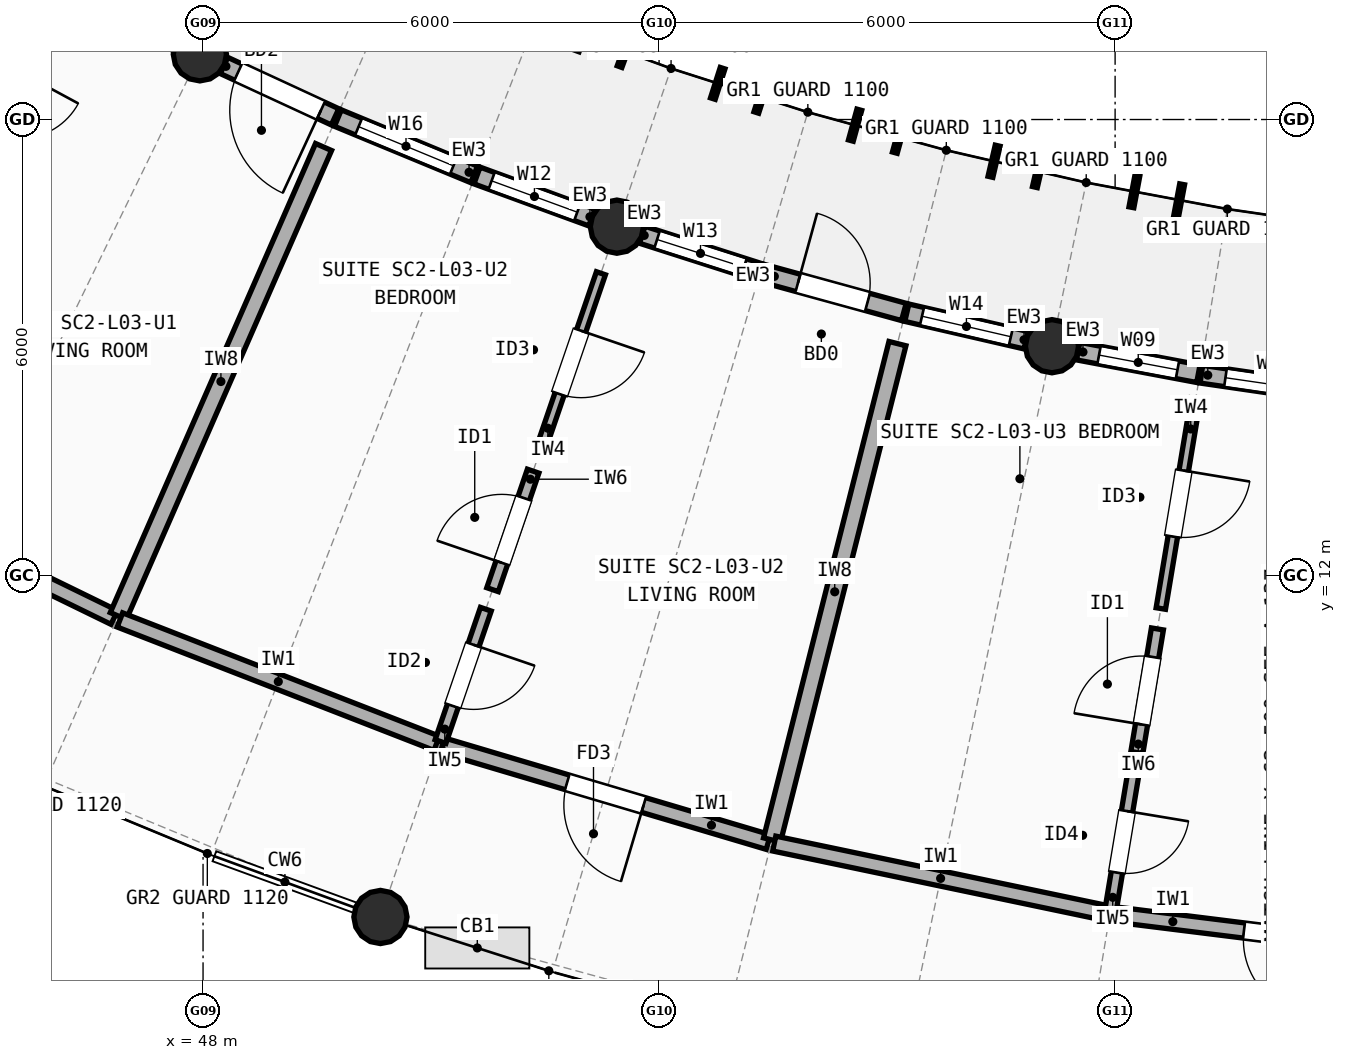
"""IFC4 building model, lengths in metres.
Left out: names, types, materials, properties, quantities, classifications, styles, units other than length and angle.
Written with IfcOpenShell. Run it as: python <this file> out.ifc"""

import sys

from ifc_helpers import new_model, si_unit, direction, frame, frame_2d, origin, origin_2d, place, context, subcontext, project, spatial, rectangle, circle, extrude, element, fill, save


model = new_model("IFC4")
c1 = context("Model", 3, precision=1e-05, world=origin(), true_north=direction((0.0, 1.0)))
c2 = subcontext(c1, "Body", "Model", "MODEL_VIEW")
j1 = project(units=[si_unit("LENGTHUNIT", "METRE"), si_unit("PLANEANGLEUNIT", "RADIAN")], contexts=[c1])
p1 = place(None, origin())
s1 = spatial("IfcSite", under=j1, at=p1, CompositionType="ELEMENT")
p2 = place(p1, origin())
s2 = spatial("IfcBuilding", under=s1, at=p2, CompositionType="ELEMENT")
p3 = place(p2, frame((0.0, 0.0, 10.9)))
s3 = spatial("IfcBuildingStorey", under=s2, at=p3, CompositionType="ELEMENT", Elevation=10.9)
for number, where, z_axis, x_axis in (
    (1, (47.958, 18.858, 0.0), (0.0, 0.0, 1.0), (1.0, 0.0, 0.0)),
    (2, (53.445, 16.59, 0.0), (0.0, 0.0, 1.0), (1.0, 0.0, 0.0)),
    (3, (50.334, 7.508, 0.0), (0.0, 0.0, 1.0), (1.0, 0.0, 0.0)),
    (4, (59.169, 15.018, 0.0), (0.0, 0.0, 1.0), (1.0, 0.0, 0.0)),
):
    element("IfcColumn", number, at=place(p3, frame(where, z_axis=z_axis, x_axis=x_axis)), inside=s3, PredefinedType="COLUMN", context=c2, shape_type="SweptSolid", body=[
        extrude(circle(Radius=0.35, at=origin_2d()), origin(), (0.0, 0.0, 1.0), 2.948),
    ])
p4 = place(p3, frame((48.276, 18.711, 0.0), z_axis=(0.0, 0.0, 1.0), x_axis=(0.907630651946, -0.419769698344, 0.0)))
e5 = element("IfcWall", 5, at=p4, inside=s3, PredefinedType="STANDARD", context=c2, shape_type="SweptSolid", body=[
    extrude(rectangle(XDim=1.61, YDim=0.235, at=frame_2d((0.805, 0.0))), origin(), (0.0, 0.0, 1.0), 2.684),
])
p5 = place(p4, frame((0.205, 0.0, 0.0)))
e6 = element("IfcOpeningElement", 6, at=p5, cuts=e5, PredefinedType="OPENING", context=c2, shape_type="SweptSolid", body=[
    extrude(rectangle(XDim=1.2, YDim=2.15, at=frame_2d((0.6, 1.075))), frame((0.0, 0.127, 0.0), z_axis=(0.0, -1.0, 0.0), x_axis=(1.0, 0.0, 0.0)), (0.0, 0.0, 1.0), 0.255),
])
p6 = place(p3, frame((49.774, 18.019, 0.0), z_axis=(0.0, 0.0, 1.0), x_axis=(0.92414555515, -0.382040564465, 0.0)))
e7 = element("IfcWall", 7, at=p6, inside=s3, PredefinedType="STANDARD", context=c2, shape_type="SweptSolid", body=[
    extrude(rectangle(XDim=1.94, YDim=0.235, at=frame_2d((0.97, 0.0))), origin(), (0.0, 0.0, 1.0), 2.684),
])
p7 = place(p6, frame((0.295, 0.0, 0.85)))
e8 = element("IfcOpeningElement", 8, at=p7, cuts=e7, PredefinedType="OPENING", context=c2, shape_type="SweptSolid", body=[
    extrude(rectangle(XDim=1.35, YDim=1.5, at=frame_2d((0.675, 0.75))), frame((0.0, 0.127, 0.0), z_axis=(0.0, -1.0, 0.0), x_axis=(1.0, 0.0, 0.0)), (0.0, 0.0, 1.0), 0.255),
])
p8 = place(p3, frame((51.604, 17.264, 0.0), z_axis=(0.0, 0.0, 1.0), x_axis=(0.939176538502, -0.34343475294, 0.0)))
e9 = element("IfcWall", 9, at=p8, inside=s3, PredefinedType="STANDARD", context=c2, shape_type="SweptSolid", body=[
    extrude(rectangle(XDim=1.61, YDim=0.235, at=frame_2d((0.805, 0.0))), origin(), (0.0, 0.0, 1.0), 2.684),
])
p9 = place(p8, frame((0.205, 0.0, 0.85)))
e10 = element("IfcOpeningElement", 10, at=p9, cuts=e9, PredefinedType="OPENING", context=c2, shape_type="SweptSolid", body=[
    extrude(rectangle(XDim=1.2, YDim=1.35, at=frame_2d((0.6, 0.675))), frame((0.0, 0.127, 0.0), z_axis=(0.0, -1.0, 0.0), x_axis=(1.0, 0.0, 0.0)), (0.0, 0.0, 1.0), 0.255),
])
p10 = place(p3, frame((53.778, 16.484, 0.0), z_axis=(0.0, 0.0, 1.0), x_axis=(0.952508629145, -0.304511594861, 0.0)))
e11 = element("IfcWall", 11, at=p10, inside=s3, PredefinedType="STANDARD", context=c2, shape_type="SweptSolid", body=[
    extrude(rectangle(XDim=1.61, YDim=0.235, at=frame_2d((0.805, 0.0))), origin(), (0.0, 0.0, 1.0), 2.684),
])
p11 = place(p10, frame((0.205, 0.0, 0.85)))
e12 = element("IfcOpeningElement", 12, at=p11, cuts=e11, PredefinedType="OPENING", context=c2, shape_type="SweptSolid", body=[
    extrude(rectangle(XDim=1.2, YDim=1.45, at=frame_2d((0.6, 0.725))), frame((0.0, 0.127, 0.0), z_axis=(0.0, -1.0, 0.0), x_axis=(1.0, 0.0, 0.0)), (0.0, 0.0, 1.0), 0.255),
])
p12 = place(p3, frame((55.35, 15.982, 0.0), z_axis=(0.0, 0.0, 1.0), x_axis=(0.964271323293, -0.264916619098, 0.0)))
e13 = element("IfcWall", 13, at=p12, inside=s3, PredefinedType="STANDARD", context=c2, shape_type="SweptSolid", body=[
    extrude(rectangle(XDim=1.94, YDim=0.235, at=frame_2d((0.97, 0.0))), origin(), (0.0, 0.0, 1.0), 2.684),
])
p13 = place(p12, frame((0.495, 0.0, 0.0)))
e14 = element("IfcOpeningElement", 14, at=p13, cuts=e13, PredefinedType="OPENING", context=c2, shape_type="SweptSolid", body=[
    extrude(rectangle(XDim=0.95, YDim=2.12, at=frame_2d((0.475, 1.06))), frame((0.0, 0.127, 0.0), z_axis=(0.0, -1.0, 0.0), x_axis=(1.0, 0.0, 0.0)), (0.0, 0.0, 1.0), 0.255),
])
p14 = place(p3, frame((57.26, 15.458, 0.0), z_axis=(0.0, 0.0, 1.0), x_axis=(0.974355406192, -0.225014538249, 0.0)))
e15 = element("IfcWall", 15, at=p14, inside=s3, PredefinedType="STANDARD", context=c2, shape_type="SweptSolid", body=[
    extrude(rectangle(XDim=1.61, YDim=0.235, at=frame_2d((0.805, 0.0))), origin(), (0.0, 0.0, 1.0), 2.684),
])
p15 = place(p14, frame((0.205, 0.0, 0.85)))
e16 = element("IfcOpeningElement", 16, at=p15, cuts=e15, PredefinedType="OPENING", context=c2, shape_type="SweptSolid", body=[
    extrude(rectangle(XDim=1.2, YDim=1.5, at=frame_2d((0.6, 0.75))), frame((0.0, 0.127, 0.0), z_axis=(0.0, -1.0, 0.0), x_axis=(1.0, 0.0, 0.0)), (0.0, 0.0, 1.0), 0.255),
])
p16 = place(p3, frame((59.513, 14.953, 0.0), z_axis=(0.0, 0.0, 1.0), x_axis=(0.982827529128, -0.184526550902, 0.0)))
e17 = element("IfcWall", 17, at=p16, inside=s3, PredefinedType="STANDARD", context=c2, shape_type="SweptSolid", body=[
    extrude(rectangle(XDim=1.61, YDim=0.235, at=frame_2d((0.805, 0.0))), origin(), (0.0, 0.0, 1.0), 2.684),
])
p17 = place(p16, frame((0.28, 0.0, 0.85)))
e18 = element("IfcOpeningElement", 18, at=p17, cuts=e17, PredefinedType="OPENING", context=c2, shape_type="SweptSolid", body=[
    extrude(rectangle(XDim=1.05, YDim=1.35, at=frame_2d((0.525, 0.675))), frame((0.0, 0.127, 0.0), z_axis=(0.0, -1.0, 0.0), x_axis=(1.0, 0.0, 0.0)), (0.0, 0.0, 1.0), 0.255),
])
p18 = place(p3, frame((61.135, 14.649, 0.0), z_axis=(0.0, 0.0, 1.0), x_axis=(0.989601751146, -0.14383453733, 0.0)))
e19 = element("IfcWall", 19, at=p18, inside=s3, PredefinedType="STANDARD", context=c2, shape_type="SweptSolid", body=[
    extrude(rectangle(XDim=1.94, YDim=0.235, at=frame_2d((0.97, 0.0))), origin(), (0.0, 0.0, 1.0), 2.684),
])
p19 = place(p18, frame((0.32, 0.0, 0.85)))
e20 = element("IfcOpeningElement", 20, at=p19, cuts=e19, PredefinedType="OPENING", context=c2, shape_type="SweptSolid", body=[
    extrude(rectangle(XDim=1.3, YDim=1.45, at=frame_2d((0.65, 0.725))), frame((0.0, 0.127, 0.0), z_axis=(0.0, -1.0, 0.0), x_axis=(1.0, 0.0, 0.0)), (0.0, 0.0, 1.0), 0.255),
])
p20 = place(p3, frame((42.812, 13.409, 0.0), z_axis=(0.0, 0.0, 1.0), x_axis=(0.898794149603, -0.438370934985, 0.0)))
e21 = element("IfcWall", 21, at=p20, inside=s3, PredefinedType="SOLIDWALL", context=c2, shape_type="SweptSolid", body=[
    extrude(rectangle(XDim=4.473, YDim=0.2, at=frame_2d((2.236, 0.0))), origin(), (0.0, 0.0, 1.0), 2.762),
])
p21 = place(p20, frame((1.747, 0.0, 0.0)))
e22 = element("IfcOpeningElement", 22, at=p21, cuts=e21, PredefinedType="OPENING", context=c2, shape_type="SweptSolid", body=[
    extrude(rectangle(XDim=0.98, YDim=2.15, at=frame_2d((0.49, 1.075))), frame((0.0, 0.11, 0.0), z_axis=(0.0, -1.0, 0.0), x_axis=(1.0, 0.0, 0.0)), (0.0, 0.0, 1.0), 0.22),
])
p22 = place(p3, frame((46.041, 19.474, 0.0), z_axis=(0.0, 0.0, 1.0), x_axis=(-0.475103009949, -0.879930184695, 0.0)))
e23 = element("IfcWall", 23, at=p22, inside=s3, PredefinedType="PARTITIONING", context=c2, shape_type="SweptSolid", body=[
    extrude(rectangle(XDim=2.8, YDim=0.125, at=frame_2d((1.4, 0.0))), origin(), (0.0, 0.0, 1.0), 2.742),
])
p23 = place(p22, frame((0.96, 0.0, 0.0)))
e24 = element("IfcOpeningElement", 24, at=p23, cuts=e23, PredefinedType="OPENING", context=c2, shape_type="SweptSolid", body=[
    extrude(rectangle(XDim=0.88, YDim=2.1, at=frame_2d((0.44, 1.05))), frame((0.0, 0.073, 0.0), z_axis=(0.0, -1.0, 0.0), x_axis=(1.0, 0.0, 0.0)), (0.0, 0.0, 1.0), 0.145),
])
p24 = place(p3, frame((49.585, 17.638, 0.0), z_axis=(0.0, 0.0, 1.0), x_axis=(-0.400932910895, -0.916107417807, 0.0)))
e25 = element("IfcWall", 25, at=p24, inside=s3, PredefinedType="SOLIDWALL", context=c2, shape_type="SweptSolid", body=[
    extrude(rectangle(XDim=6.736, YDim=0.23, at=frame_2d((3.368, 0.0))), origin(), (0.0, 0.0, 1.0), 2.722),
])
p25 = place(p3, frame((46.906, 11.417, 0.0), z_axis=(0.0, 0.0, 1.0), x_axis=(0.931847867525, -0.362849213571, 0.0)))
e26 = element("IfcWall", 26, at=p25, inside=s3, PredefinedType="SOLIDWALL", context=c2, shape_type="SweptSolid", body=[
    extrude(rectangle(XDim=4.473, YDim=0.2, at=frame_2d((2.237, 0.0))), origin(), (0.0, 0.0, 1.0), 2.742),
])
p26 = place(p3, frame((51.15, 9.768, 0.0), z_axis=(0.0, 0.0, 1.0), x_axis=(0.958602413557, -0.28474798107, 0.0)))
e27 = element("IfcWall", 27, at=p26, inside=s3, PredefinedType="SOLIDWALL", context=c2, shape_type="SweptSolid", body=[
    extrude(rectangle(XDim=4.473, YDim=0.2, at=frame_2d((2.236, 0.0))), origin(), (0.0, 0.0, 1.0), 2.722),
])
p27 = place(p26, frame((1.711, 0.0, 0.0)))
e28 = element("IfcOpeningElement", 28, at=p27, cuts=e27, PredefinedType="OPENING", context=c2, shape_type="SweptSolid", body=[
    extrude(rectangle(XDim=1.05, YDim=2.15, at=frame_2d((0.525, 1.075))), frame((0.0, 0.11, 0.0), z_axis=(0.0, -1.0, 0.0), x_axis=(1.0, 0.0, 0.0)), (0.0, 0.0, 1.0), 0.22),
])
p28 = place(p3, frame((53.235, 15.977, 0.0), z_axis=(0.0, 0.0, 1.0), x_axis=(-0.324072633759, -0.946032202437, 0.0)))
e29 = element("IfcWall", 29, at=p28, inside=s3, PredefinedType="PARTITIONING", context=c2, shape_type="SweptSolid", body=[
    extrude(rectangle(XDim=2.48, YDim=0.125, at=frame_2d((1.24, 0.0))), origin(), (0.0, 0.0, 1.0), 2.762),
])
p29 = place(p28, frame((0.8, 0.0, 0.0)))
e30 = element("IfcOpeningElement", 30, at=p29, cuts=e29, PredefinedType="OPENING", context=c2, shape_type="SweptSolid", body=[
    extrude(rectangle(XDim=0.88, YDim=2.1, at=frame_2d((0.44, 1.05))), frame((0.0, 0.073, 0.0), z_axis=(0.0, -1.0, 0.0), x_axis=(1.0, 0.0, 0.0)), (0.0, 0.0, 1.0), 0.145),
])
p30 = place(p3, frame((52.343, 13.374, 0.0), z_axis=(0.0, 0.0, 1.0), x_axis=(-0.324127376206, -0.946013448104, 0.0)))
e31 = element("IfcWall", 31, at=p30, inside=s3, PredefinedType="PLUMBINGWALL", context=c2, shape_type="SweptSolid", body=[
    extrude(rectangle(XDim=1.648, YDim=0.16, at=frame_2d((0.824, 0.0))), origin(), (0.0, 0.0, 1.0), 2.762),
])
p31 = place(p30, frame((0.374, 0.0, 0.0)))
e32 = element("IfcOpeningElement", 32, at=p31, cuts=e31, PredefinedType="OPENING", context=c2, shape_type="SweptSolid", body=[
    extrude(rectangle(XDim=0.9, YDim=2.1, at=frame_2d((0.45, 1.05))), frame((0.0, 0.09, 0.0), z_axis=(0.0, -1.0, 0.0), x_axis=(1.0, 0.0, 0.0)), (0.0, 0.0, 1.0), 0.18),
])
p32 = place(p3, frame((51.721, 11.558, 0.0), z_axis=(0.0, 0.0, 1.0), x_axis=(-0.323978335312, -0.946064500046, 0.0)))
e33 = element("IfcWall", 33, at=p32, inside=s3, PredefinedType="PARTITIONING", context=c2, shape_type="SweptSolid", body=[
    extrude(rectangle(XDim=1.84, YDim=0.15, at=frame_2d((0.92, 0.0))), origin(), (0.0, 0.0, 1.0), 2.762),
])
p33 = place(p32, frame((0.495, 0.0, 0.0)))
e34 = element("IfcOpeningElement", 34, at=p33, cuts=e33, PredefinedType="OPENING", context=c2, shape_type="SweptSolid", body=[
    extrude(rectangle(XDim=0.85, YDim=2.1, at=frame_2d((0.425, 1.05))), frame((0.0, 0.085, 0.0), z_axis=(0.0, -1.0, 0.0), x_axis=(1.0, 0.0, 0.0)), (0.0, 0.0, 1.0), 0.17),
])
p34 = place(p3, frame((57.136, 15.052, 0.0), z_axis=(0.0, 0.0, 1.0), x_axis=(-0.244982481903, -0.969527505314, 0.0)))
e35 = element("IfcWall", 35, at=p34, inside=s3, PredefinedType="SOLIDWALL", context=c2, shape_type="SweptSolid", body=[
    extrude(rectangle(XDim=6.736, YDim=0.23, at=frame_2d((3.368, 0.0))), origin(), (0.0, 0.0, 1.0), 2.742),
])
p35 = place(p3, frame((55.515, 8.474, 0.0), z_axis=(0.0, 0.0, 1.0), x_axis=(0.978806148413, -0.204788973894, 0.0)))
e36 = element("IfcWall", 36, at=p35, inside=s3, PredefinedType="SOLIDWALL", context=c2, shape_type="SweptSolid", body=[
    extrude(rectangle(XDim=4.473, YDim=0.2, at=frame_2d((2.236, 0.0))), origin(), (0.0, 0.0, 1.0), 2.762),
])
p36 = place(p3, frame((59.972, 7.545, 0.0), z_axis=(0.0, 0.0, 1.0), x_axis=(0.992349920368, -0.123457019023, 0.0)))
e37 = element("IfcWall", 37, at=p36, inside=s3, PredefinedType="SOLIDWALL", context=c2, shape_type="SweptSolid", body=[
    extrude(rectangle(XDim=4.473, YDim=0.2, at=frame_2d((2.237, 0.0))), origin(), (0.0, 0.0, 1.0), 2.742),
])
p37 = place(p36, frame((1.737, 0.0, 0.0)))
e38 = element("IfcOpeningElement", 38, at=p37, cuts=e37, PredefinedType="OPENING", context=c2, shape_type="SweptSolid", body=[
    extrude(rectangle(XDim=1.0, YDim=2.15, at=frame_2d((0.5, 1.075))), frame((0.0, 0.11, 0.0), z_axis=(0.0, -1.0, 0.0), x_axis=(1.0, 0.0, 0.0)), (0.0, 0.0, 1.0), 0.22),
])
p38 = place(p3, frame((61.061, 14.328, 0.0), z_axis=(0.0, 0.0, 1.0), x_axis=(-0.164186889233, -0.986429250075, 0.0)))
e39 = element("IfcWall", 39, at=p38, inside=s3, PredefinedType="PARTITIONING", context=c2, shape_type="SweptSolid", body=[
    extrude(rectangle(XDim=2.8, YDim=0.125, at=frame_2d((1.4, 0.0))), origin(), (0.0, 0.0, 1.0), 2.722),
])
p39 = place(p38, frame((0.96, 0.0, 0.0)))
e40 = element("IfcOpeningElement", 40, at=p39, cuts=e39, PredefinedType="OPENING", context=c2, shape_type="SweptSolid", body=[
    extrude(rectangle(XDim=0.88, YDim=2.1, at=frame_2d((0.44, 1.05))), frame((0.0, 0.073, 0.0), z_axis=(0.0, -1.0, 0.0), x_axis=(1.0, 0.0, 0.0)), (0.0, 0.0, 1.0), 0.145),
])
p40 = place(p3, frame((60.557, 11.298, 0.0), z_axis=(0.0, 0.0, 1.0), x_axis=(-0.164158726706, -0.986433937193, 0.0)))
e41 = element("IfcWall", 41, at=p40, inside=s3, PredefinedType="PLUMBINGWALL", context=c2, shape_type="SweptSolid", body=[
    extrude(rectangle(XDim=1.648, YDim=0.16, at=frame_2d((0.824, 0.0))), origin(), (0.0, 0.0, 1.0), 2.722),
])
p41 = place(p40, frame((0.374, 0.0, 0.0)))
e42 = element("IfcOpeningElement", 42, at=p41, cuts=e41, PredefinedType="OPENING", context=c2, shape_type="SweptSolid", body=[
    extrude(rectangle(XDim=0.9, YDim=2.1, at=frame_2d((0.45, 1.05))), frame((0.0, 0.09, 0.0), z_axis=(0.0, -1.0, 0.0), x_axis=(1.0, 0.0, 0.0)), (0.0, 0.0, 1.0), 0.18),
])
p42 = place(p3, frame((60.241, 9.404, 0.0), z_axis=(0.0, 0.0, 1.0), x_axis=(-0.16414076901, -0.986436925479, 0.0)))
e43 = element("IfcWall", 43, at=p42, inside=s3, PredefinedType="PARTITIONING", context=c2, shape_type="SweptSolid", body=[
    extrude(rectangle(XDim=1.84, YDim=0.15, at=frame_2d((0.92, 0.0))), origin(), (0.0, 0.0, 1.0), 2.722),
])
p43 = place(p42, frame((0.51, 0.0, 0.0)))
e44 = element("IfcOpeningElement", 44, at=p43, cuts=e43, PredefinedType="OPENING", context=c2, shape_type="SweptSolid", body=[
    extrude(rectangle(XDim=0.82, YDim=2.08, at=frame_2d((0.41, 1.04))), frame((0.0, 0.085, 0.0), z_axis=(0.0, -1.0, 0.0), x_axis=(1.0, 0.0, 0.0)), (0.0, 0.0, 1.0), 0.17),
])
p44 = place(p5, origin())
e45 = element("IfcDoor", 45, at=p44, inside=s3, OperationType="SINGLE_SWING_RIGHT", PredefinedType="DOOR", context=c2, shape_type="SweptSolid", body=[
    extrude(rectangle(XDim=1.2, YDim=2.15, at=frame_2d((0.6, 1.075))), frame((0.0, 0.025, 0.0), z_axis=(0.0, -1.0, 0.0), x_axis=(1.0, 0.0, 0.0)), (0.0, 0.0, 1.0), 0.05),
])
fill(e6, e45)
p45 = place(p7, origin())
e46 = element("IfcWindow", 46, at=p45, inside=s3, PartitioningType="SINGLE_PANEL", PredefinedType="WINDOW", context=c2, shape_type="SweptSolid", body=[
    extrude(rectangle(XDim=1.35, YDim=1.5, at=frame_2d((0.675, 0.75))), frame((0.0, 0.03, 0.0), z_axis=(0.0, -1.0, 0.0), x_axis=(1.0, 0.0, 0.0)), (0.0, 0.0, 1.0), 0.06),
])
fill(e8, e46)
p46 = place(p9, origin())
e47 = element("IfcWindow", 47, at=p46, inside=s3, PartitioningType="SINGLE_PANEL", PredefinedType="WINDOW", context=c2, shape_type="SweptSolid", body=[
    extrude(rectangle(XDim=1.2, YDim=1.35, at=frame_2d((0.6, 0.675))), frame((0.0, 0.03, 0.0), z_axis=(0.0, -1.0, 0.0), x_axis=(1.0, 0.0, 0.0)), (0.0, 0.0, 1.0), 0.06),
])
fill(e10, e47)
p47 = place(p11, origin())
e48 = element("IfcWindow", 48, at=p47, inside=s3, PartitioningType="SINGLE_PANEL", PredefinedType="WINDOW", context=c2, shape_type="SweptSolid", body=[
    extrude(rectangle(XDim=1.2, YDim=1.45, at=frame_2d((0.6, 0.725))), frame((0.0, 0.03, 0.0), z_axis=(0.0, -1.0, 0.0), x_axis=(1.0, 0.0, 0.0)), (0.0, 0.0, 1.0), 0.06),
])
fill(e12, e48)
p48 = place(p13, origin())
e49 = element("IfcDoor", 49, at=p48, inside=s3, OperationType="SINGLE_SWING_LEFT", PredefinedType="DOOR", context=c2, shape_type="SweptSolid", body=[
    extrude(rectangle(XDim=0.95, YDim=2.12, at=frame_2d((0.475, 1.06))), frame((0.0, 0.025, 0.0), z_axis=(0.0, -1.0, 0.0), x_axis=(1.0, 0.0, 0.0)), (0.0, 0.0, 1.0), 0.05),
])
fill(e14, e49)
p49 = place(p15, origin())
e50 = element("IfcWindow", 50, at=p49, inside=s3, PartitioningType="SINGLE_PANEL", PredefinedType="WINDOW", context=c2, shape_type="SweptSolid", body=[
    extrude(rectangle(XDim=1.2, YDim=1.5, at=frame_2d((0.6, 0.75))), frame((0.0, 0.03, 0.0), z_axis=(0.0, -1.0, 0.0), x_axis=(1.0, 0.0, 0.0)), (0.0, 0.0, 1.0), 0.06),
])
fill(e16, e50)
p50 = place(p17, origin())
e51 = element("IfcWindow", 51, at=p50, inside=s3, PartitioningType="SINGLE_PANEL", PredefinedType="WINDOW", context=c2, shape_type="SweptSolid", body=[
    extrude(rectangle(XDim=1.05, YDim=1.35, at=frame_2d((0.525, 0.675))), frame((0.0, 0.03, 0.0), z_axis=(0.0, -1.0, 0.0), x_axis=(1.0, 0.0, 0.0)), (0.0, 0.0, 1.0), 0.06),
])
fill(e18, e51)
p51 = place(p19, origin())
e52 = element("IfcWindow", 52, at=p51, inside=s3, PartitioningType="SINGLE_PANEL", PredefinedType="WINDOW", context=c2, shape_type="SweptSolid", body=[
    extrude(rectangle(XDim=1.3, YDim=1.45, at=frame_2d((0.65, 0.725))), frame((0.0, 0.03, 0.0), z_axis=(0.0, -1.0, 0.0), x_axis=(1.0, 0.0, 0.0)), (0.0, 0.0, 1.0), 0.06),
])
fill(e20, e52)
p52 = place(p27, origin())
e53 = element("IfcDoor", 53, at=p52, inside=s3, OperationType="SINGLE_SWING_RIGHT", PredefinedType="DOOR", context=c2, shape_type="SweptSolid", body=[
    extrude(rectangle(XDim=1.05, YDim=2.15, at=frame_2d((0.525, 1.075))), frame((0.0, 0.025, 0.0), z_axis=(0.0, -1.0, 0.0), x_axis=(1.0, 0.0, 0.0)), (0.0, 0.0, 1.0), 0.05),
])
fill(e28, e53)
p53 = place(p29, origin())
e54 = element("IfcDoor", 54, at=p53, inside=s3, OperationType="SINGLE_SWING_LEFT", PredefinedType="DOOR", context=c2, shape_type="SweptSolid", body=[
    extrude(rectangle(XDim=0.88, YDim=2.1, at=frame_2d((0.44, 1.05))), frame((0.0, 0.025, 0.0), z_axis=(0.0, -1.0, 0.0), x_axis=(1.0, 0.0, 0.0)), (0.0, 0.0, 1.0), 0.05),
])
fill(e30, e54)
p54 = place(p31, origin())
e55 = element("IfcDoor", 55, at=p54, inside=s3, OperationType="SINGLE_SWING_RIGHT", PredefinedType="DOOR", context=c2, shape_type="SweptSolid", body=[
    extrude(rectangle(XDim=0.9, YDim=2.1, at=frame_2d((0.45, 1.05))), frame((0.0, 0.025, 0.0), z_axis=(0.0, -1.0, 0.0), x_axis=(1.0, 0.0, 0.0)), (0.0, 0.0, 1.0), 0.05),
])
fill(e32, e55)
p55 = place(p33, origin())
e56 = element("IfcDoor", 56, at=p55, inside=s3, OperationType="SINGLE_SWING_LEFT", PredefinedType="DOOR", context=c2, shape_type="SweptSolid", body=[
    extrude(rectangle(XDim=0.85, YDim=2.1, at=frame_2d((0.425, 1.05))), frame((0.0, 0.025, 0.0), z_axis=(0.0, -1.0, 0.0), x_axis=(1.0, 0.0, 0.0)), (0.0, 0.0, 1.0), 0.05),
])
fill(e34, e56)
p56 = place(p37, origin())
e57 = element("IfcDoor", 57, at=p56, inside=s3, OperationType="SINGLE_SWING_RIGHT", PredefinedType="DOOR", context=c2, shape_type="SweptSolid", body=[
    extrude(rectangle(XDim=1.0, YDim=2.15, at=frame_2d((0.5, 1.075))), frame((0.0, 0.025, 0.0), z_axis=(0.0, -1.0, 0.0), x_axis=(1.0, 0.0, 0.0)), (0.0, 0.0, 1.0), 0.05),
])
fill(e38, e57)
p57 = place(p39, origin())
e58 = element("IfcDoor", 58, at=p57, inside=s3, OperationType="SINGLE_SWING_LEFT", PredefinedType="DOOR", context=c2, shape_type="SweptSolid", body=[
    extrude(rectangle(XDim=0.88, YDim=2.1, at=frame_2d((0.44, 1.05))), frame((0.0, 0.025, 0.0), z_axis=(0.0, -1.0, 0.0), x_axis=(1.0, 0.0, 0.0)), (0.0, 0.0, 1.0), 0.05),
])
fill(e40, e58)
p58 = place(p41, origin())
e59 = element("IfcDoor", 59, at=p58, inside=s3, OperationType="SINGLE_SWING_RIGHT", PredefinedType="DOOR", context=c2, shape_type="SweptSolid", body=[
    extrude(rectangle(XDim=0.9, YDim=2.1, at=frame_2d((0.45, 1.05))), frame((0.0, 0.025, 0.0), z_axis=(0.0, -1.0, 0.0), x_axis=(1.0, 0.0, 0.0)), (0.0, 0.0, 1.0), 0.05),
])
fill(e42, e59)
p59 = place(p43, origin())
e60 = element("IfcDoor", 60, at=p59, inside=s3, OperationType="SINGLE_SWING_LEFT", PredefinedType="DOOR", context=c2, shape_type="SweptSolid", body=[
    extrude(rectangle(XDim=0.82, YDim=2.08, at=frame_2d((0.41, 1.04))), frame((0.0, 0.025, 0.0), z_axis=(0.0, -1.0, 0.0), x_axis=(1.0, 0.0, 0.0)), (0.0, 0.0, 1.0), 0.05),
])
fill(e44, e60)
save(model, sys.argv[1])
